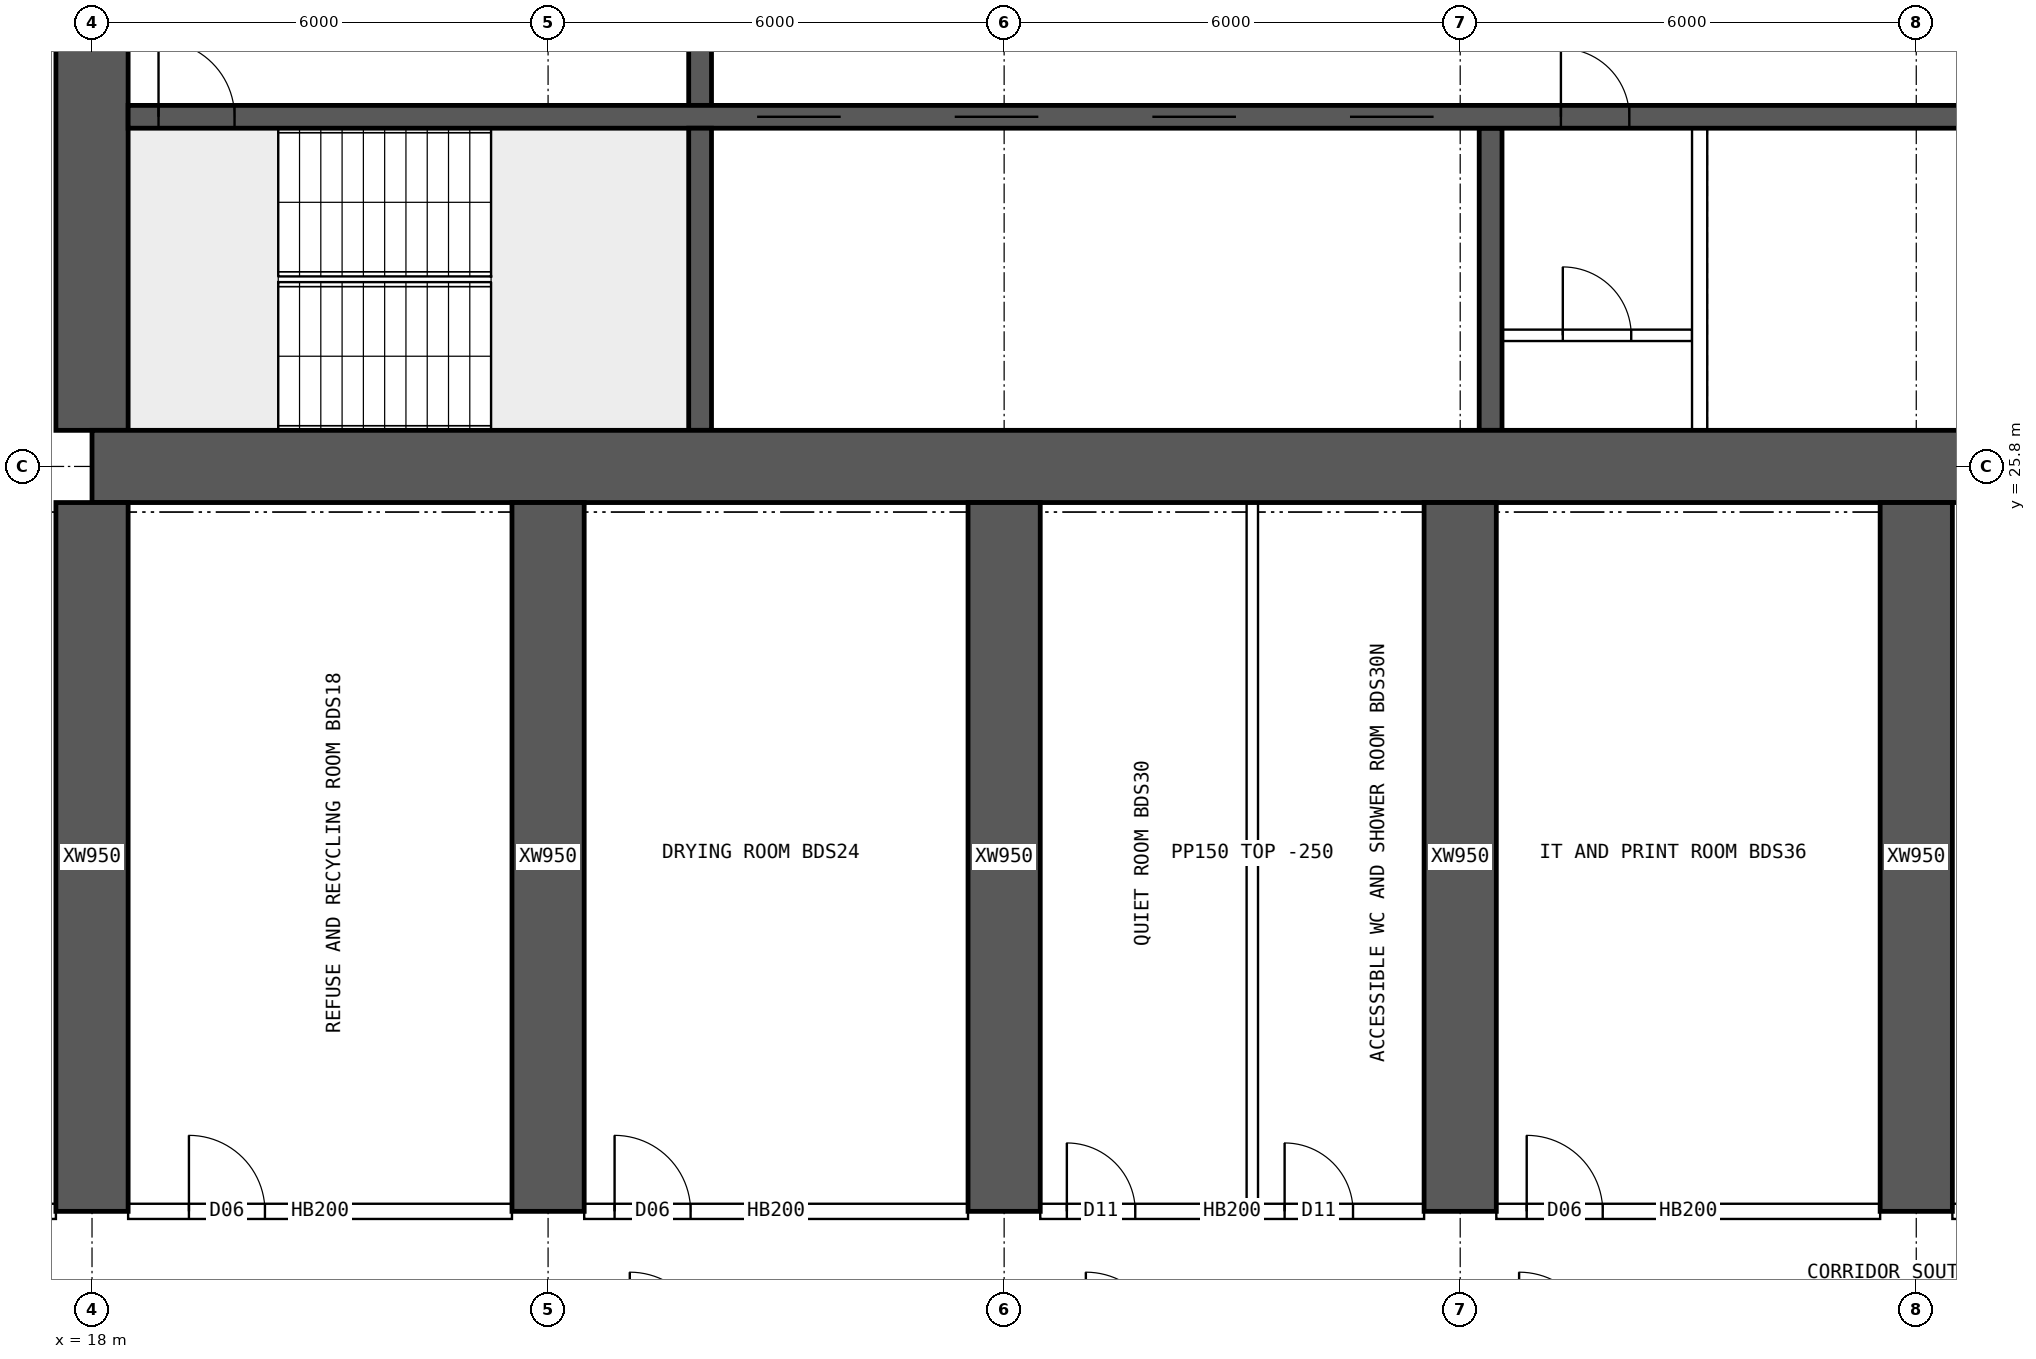
"""IFC4 building model, lengths in metres.
Left out: names, types, materials, properties, quantities, classifications, styles, units other than length and angle.
Written with IfcOpenShell. Run it as: python <this file> out.ifc"""

import sys

from ifc_helpers import new_model, si_unit, direction, frame, frame_2d, origin, place, context, subcontext, project, spatial, rectangle, extrude, element, fill, save


model = new_model("IFC4")
c1 = context("Model", 3, precision=1e-05, world=origin(), true_north=direction((0.0, 1.0)))
c2 = subcontext(c1, "Body", "Model", "MODEL_VIEW")
j1 = project(units=[si_unit("LENGTHUNIT", "METRE"), si_unit("PLANEANGLEUNIT", "RADIAN")], contexts=[c1])
p1 = place(None, origin())
s1 = spatial("IfcSite", under=j1, at=p1, CompositionType="ELEMENT")
p2 = place(p1, origin())
s2 = spatial("IfcBuilding", under=s1, at=p2, CompositionType="ELEMENT")
p3 = place(p2, frame((0.0, 0.0, 103.15)))
s3 = spatial("IfcBuildingStorey", under=s2, at=p3, CompositionType="ELEMENT", Elevation=103.15)
p4 = place(p3, frame((18.0, 25.8, 0.0), z_axis=(0.0, 0.0, 1.0), x_axis=(1.0, 0.0, 0.0)))
e1 = element("IfcWall", 1, at=p4, inside=s3, PredefinedType="SHEAR", context=c2, shape_type="SweptSolid", body=[
    extrude(rectangle(XDim=48.0, YDim=0.95, at=frame_2d((24.0, 0.0))), origin(), (0.0, 0.0, 1.0), 3.75),
])
p5 = place(p3, frame((18.0, 26.275, 0.0), z_axis=(0.0, 0.0, 1.0), x_axis=(0.0, 1.0, 0.0)))
e2 = element("IfcWall", 2, at=p5, inside=s3, PredefinedType="SHEAR", context=c2, shape_type="SweptSolid", body=[
    extrude(rectangle(XDim=11.45, YDim=0.95, at=frame_2d((5.725, 0.0))), origin(), (0.0, 0.0, 1.0), 3.75),
])
p6 = place(p5, frame((5.025, 0.0, 0.0)))
e3 = element("IfcOpeningElement", 3, at=p6, cuts=e2, PredefinedType="OPENING", context=c2, shape_type="SweptSolid", body=[
    extrude(rectangle(XDim=1.2, YDim=2.1, at=frame_2d((0.6, 1.05))), frame((0.0, 0.485, 0.0), z_axis=(0.0, -1.0, 0.0), x_axis=(1.0, 0.0, 0.0)), (0.0, 0.0, 1.0), 0.97),
])
p7 = place(p3, frame((18.475, 30.4, 0.0), z_axis=(0.0, 0.0, 1.0), x_axis=(1.0, 0.0, 0.0)))
e4 = element("IfcWall", 4, at=p7, inside=s3, PredefinedType="SHEAR", context=c2, shape_type="SweptSolid", body=[
    extrude(rectangle(XDim=47.05, YDim=0.3, at=frame_2d((23.525, 0.0))), origin(), (0.0, 0.0, 1.0), 3.75),
])
p8 = place(p7, frame((0.4, 0.0, 0.0)))
e5 = element("IfcOpeningElement", 5, at=p8, cuts=e4, PredefinedType="OPENING", context=c2, shape_type="SweptSolid", body=[
    extrude(rectangle(XDim=1.0, YDim=2.1, at=frame_2d((0.5, 1.05))), frame((0.0, 0.16, 0.0), z_axis=(0.0, -1.0, 0.0), x_axis=(1.0, 0.0, 0.0)), (0.0, 0.0, 1.0), 0.32),
])
p9 = place(p7, frame((45.65, 0.0, 0.0)))
e6 = element("IfcOpeningElement", 6, at=p9, cuts=e4, PredefinedType="OPENING", context=c2, shape_type="SweptSolid", body=[
    extrude(rectangle(XDim=1.0, YDim=2.1, at=frame_2d((0.5, 1.05))), frame((0.0, 0.16, 0.0), z_axis=(0.0, -1.0, 0.0), x_axis=(1.0, 0.0, 0.0)), (0.0, 0.0, 1.0), 0.32),
])
p10 = place(p7, frame((8.275, 0.0, 0.0)))
e7 = element("IfcOpeningElement", 7, at=p10, cuts=e4, PredefinedType="OPENING", context=c2, shape_type="SweptSolid", body=[
    extrude(rectangle(XDim=1.1, YDim=2.1, at=frame_2d((0.55, 1.05))), frame((0.0, 0.16, 0.0), z_axis=(0.0, -1.0, 0.0), x_axis=(1.0, 0.0, 0.0)), (0.0, 0.0, 1.0), 0.32),
])
p11 = place(p7, frame((10.875, 0.0, 0.0)))
e8 = element("IfcOpeningElement", 8, at=p11, cuts=e4, PredefinedType="OPENING", context=c2, shape_type="SweptSolid", body=[
    extrude(rectangle(XDim=1.1, YDim=2.1, at=frame_2d((0.55, 1.05))), frame((0.0, 0.16, 0.0), z_axis=(0.0, -1.0, 0.0), x_axis=(1.0, 0.0, 0.0)), (0.0, 0.0, 1.0), 0.32),
])
p12 = place(p7, frame((13.475, 0.0, 0.0)))
e9 = element("IfcOpeningElement", 9, at=p12, cuts=e4, PredefinedType="OPENING", context=c2, shape_type="SweptSolid", body=[
    extrude(rectangle(XDim=1.1, YDim=2.1, at=frame_2d((0.55, 1.05))), frame((0.0, 0.16, 0.0), z_axis=(0.0, -1.0, 0.0), x_axis=(1.0, 0.0, 0.0)), (0.0, 0.0, 1.0), 0.32),
])
p13 = place(p7, frame((16.075, 0.0, 0.0)))
e10 = element("IfcOpeningElement", 10, at=p13, cuts=e4, PredefinedType="OPENING", context=c2, shape_type="SweptSolid", body=[
    extrude(rectangle(XDim=1.1, YDim=2.1, at=frame_2d((0.55, 1.05))), frame((0.0, 0.16, 0.0), z_axis=(0.0, -1.0, 0.0), x_axis=(1.0, 0.0, 0.0)), (0.0, 0.0, 1.0), 0.32),
])
p14 = place(p7, frame((18.85, 0.0, 0.0)))
e11 = element("IfcOpeningElement", 11, at=p14, cuts=e4, PredefinedType="OPENING", context=c2, shape_type="SweptSolid", body=[
    extrude(rectangle(XDim=0.9, YDim=2.1, at=frame_2d((0.45, 1.05))), frame((0.0, 0.16, 0.0), z_axis=(0.0, -1.0, 0.0), x_axis=(1.0, 0.0, 0.0)), (0.0, 0.0, 1.0), 0.32),
])
p15 = place(p7, frame((30.142, 0.0, 0.0)))
e12 = element("IfcOpeningElement", 12, at=p15, cuts=e4, PredefinedType="OPENING", context=c2, shape_type="SweptSolid", body=[
    extrude(rectangle(XDim=1.1, YDim=2.1, at=frame_2d((0.55, 1.05))), frame((0.0, 0.16, 0.0), z_axis=(0.0, -1.0, 0.0), x_axis=(1.0, 0.0, 0.0)), (0.0, 0.0, 1.0), 0.32),
])
p16 = place(p7, frame((33.675, 0.0, 0.0)))
e13 = element("IfcOpeningElement", 13, at=p16, cuts=e4, PredefinedType="OPENING", context=c2, shape_type="SweptSolid", body=[
    extrude(rectangle(XDim=1.1, YDim=2.1, at=frame_2d((0.55, 1.05))), frame((0.0, 0.16, 0.0), z_axis=(0.0, -1.0, 0.0), x_axis=(1.0, 0.0, 0.0)), (0.0, 0.0, 1.0), 0.32),
])
p17 = place(p7, frame((37.208, 0.0, 0.0)))
e14 = element("IfcOpeningElement", 14, at=p17, cuts=e4, PredefinedType="OPENING", context=c2, shape_type="SweptSolid", body=[
    extrude(rectangle(XDim=1.1, YDim=2.1, at=frame_2d((0.55, 1.05))), frame((0.0, 0.16, 0.0), z_axis=(0.0, -1.0, 0.0), x_axis=(1.0, 0.0, 0.0)), (0.0, 0.0, 1.0), 0.32),
])
p18 = place(p3, frame((26.0, 26.275, 0.0), z_axis=(0.0, 0.0, 1.0), x_axis=(0.0, 1.0, 0.0)))
e15 = element("IfcWall", 15, at=p18, inside=s3, PredefinedType="SHEAR", context=c2, shape_type="SweptSolid", body=[
    extrude(rectangle(XDim=3.975, YDim=0.3, at=frame_2d((1.988, 0.0))), origin(), (0.0, 0.0, 1.0), 3.75),
])
p19 = place(p3, frame((26.0, 30.55, 0.0), z_axis=(0.0, 0.0, 1.0), x_axis=(0.0, 1.0, 0.0)))
e16 = element("IfcWall", 16, at=p19, inside=s3, PredefinedType="SHEAR", context=c2, shape_type="SweptSolid", body=[
    extrude(rectangle(XDim=3.9, YDim=0.3, at=frame_2d((1.95, 0.0))), origin(), (0.0, 0.0, 1.0), 3.75),
])
p20 = place(p19, frame((1.4, 0.0, 0.0)))
e17 = element("IfcOpeningElement", 17, at=p20, cuts=e16, PredefinedType="OPENING", context=c2, shape_type="SweptSolid", body=[
    extrude(rectangle(XDim=1.2, YDim=2.1, at=frame_2d((0.6, 1.05))), frame((0.0, 0.16, 0.0), z_axis=(0.0, -1.0, 0.0), x_axis=(1.0, 0.0, 0.0)), (0.0, 0.0, 1.0), 0.32),
])
p21 = place(p3, frame((36.4, 26.275, 0.0), z_axis=(0.0, 0.0, 1.0), x_axis=(0.0, 1.0, 0.0)))
e18 = element("IfcWall", 18, at=p21, inside=s3, PredefinedType="SHEAR", context=c2, shape_type="SweptSolid", body=[
    extrude(rectangle(XDim=3.975, YDim=0.3, at=frame_2d((1.988, 0.0))), origin(), (0.0, 0.0, 1.0), 3.75),
])
for number, where, z_axis, x_axis in (
    (19, (18.0, 16.0, 0.0), (0.0, 0.0, 1.0), (0.0, 1.0, 0.0)),
    (20, (24.0, 16.0, 0.0), (0.0, 0.0, 1.0), (0.0, 1.0, 0.0)),
    (21, (30.0, 16.0, 0.0), (0.0, 0.0, 1.0), (0.0, 1.0, 0.0)),
    (22, (36.0, 16.0, 0.0), (0.0, 0.0, 1.0), (0.0, 1.0, 0.0)),
    (23, (42.0, 16.0, 0.0), (0.0, 0.0, 1.0), (0.0, 1.0, 0.0)),
):
    element("IfcWall", number, at=place(p3, frame(where, z_axis=z_axis, x_axis=x_axis)), inside=s3, PredefinedType="SHEAR", context=c2, shape_type="SweptSolid", body=[
        extrude(rectangle(XDim=9.325, YDim=0.95, at=frame_2d((4.663, 0.0))), origin(), (0.0, 0.0, 1.0), 3.75),
    ])
p22 = place(p3, frame((36.55, 27.525, 0.0), z_axis=(0.0, 0.0, 1.0), x_axis=(1.0, 0.0, 0.0)))
e24 = element("IfcWall", 24, at=p22, inside=s3, PredefinedType="SOLIDWALL", context=c2, shape_type="SweptSolid", body=[
    extrude(rectangle(XDim=2.5, YDim=0.15, at=frame_2d((1.25, 0.0))), origin(), (0.0, 0.0, 1.0), 3.5),
])
p23 = place(p22, frame((0.8, 0.0, 0.0)))
e25 = element("IfcOpeningElement", 25, at=p23, cuts=e24, PredefinedType="OPENING", context=c2, shape_type="SweptSolid", body=[
    extrude(rectangle(XDim=0.9, YDim=2.1, at=frame_2d((0.45, 1.05))), frame((0.0, 0.085, 0.0), z_axis=(0.0, -1.0, 0.0), x_axis=(1.0, 0.0, 0.0)), (0.0, 0.0, 1.0), 0.17),
])
p24 = place(p3, frame((39.15, 26.275, 0.0), z_axis=(0.0, 0.0, 1.0), x_axis=(0.0, 1.0, 0.0)))
e26 = element("IfcWall", 26, at=p24, inside=s3, PredefinedType="SOLIDWALL", context=c2, shape_type="SweptSolid", body=[
    extrude(rectangle(XDim=3.975, YDim=0.2, at=frame_2d((1.988, 0.0))), origin(), (0.0, 0.0, 1.0), 3.5),
])
p25 = place(p3, frame((12.475, 16.0, 0.0), z_axis=(0.0, 0.0, 1.0), x_axis=(1.0, 0.0, 0.0)))
e27 = element("IfcWall", 27, at=p25, inside=s3, PredefinedType="SOLIDWALL", context=c2, shape_type="SweptSolid", body=[
    extrude(rectangle(XDim=5.05, YDim=0.2, at=frame_2d((2.525, 0.0))), origin(), (0.0, 0.0, 1.0), 3.5),
])
p26 = place(p25, frame((3.325, 0.0, 0.0)))
e28 = element("IfcOpeningElement", 28, at=p26, cuts=e27, PredefinedType="OPENING", context=c2, shape_type="SweptSolid", body=[
    extrude(rectangle(XDim=1.6, YDim=2.1, at=frame_2d((0.8, 1.05))), frame((0.0, 0.11, 0.0), z_axis=(0.0, -1.0, 0.0), x_axis=(1.0, 0.0, 0.0)), (0.0, 0.0, 1.0), 0.22),
])
p27 = place(p3, frame((18.475, 16.0, 0.0), z_axis=(0.0, 0.0, 1.0), x_axis=(1.0, 0.0, 0.0)))
e29 = element("IfcWall", 29, at=p27, inside=s3, PredefinedType="SOLIDWALL", context=c2, shape_type="SweptSolid", body=[
    extrude(rectangle(XDim=5.05, YDim=0.2, at=frame_2d((2.525, 0.0))), origin(), (0.0, 0.0, 1.0), 3.5),
])
p28 = place(p27, frame((0.8, 0.0, 0.0)))
e30 = element("IfcOpeningElement", 30, at=p28, cuts=e29, PredefinedType="OPENING", context=c2, shape_type="SweptSolid", body=[
    extrude(rectangle(XDim=1.0, YDim=2.1, at=frame_2d((0.5, 1.05))), frame((0.0, 0.11, 0.0), z_axis=(0.0, -1.0, 0.0), x_axis=(1.0, 0.0, 0.0)), (0.0, 0.0, 1.0), 0.22),
])
p29 = place(p3, frame((24.475, 16.0, 0.0), z_axis=(0.0, 0.0, 1.0), x_axis=(1.0, 0.0, 0.0)))
e31 = element("IfcWall", 31, at=p29, inside=s3, PredefinedType="SOLIDWALL", context=c2, shape_type="SweptSolid", body=[
    extrude(rectangle(XDim=5.05, YDim=0.2, at=frame_2d((2.525, 0.0))), origin(), (0.0, 0.0, 1.0), 3.5),
])
p30 = place(p29, frame((0.4, 0.0, 0.0)))
e32 = element("IfcOpeningElement", 32, at=p30, cuts=e31, PredefinedType="OPENING", context=c2, shape_type="SweptSolid", body=[
    extrude(rectangle(XDim=1.0, YDim=2.1, at=frame_2d((0.5, 1.05))), frame((0.0, 0.11, 0.0), z_axis=(0.0, -1.0, 0.0), x_axis=(1.0, 0.0, 0.0)), (0.0, 0.0, 1.0), 0.22),
])
p31 = place(p3, frame((30.475, 16.0, 0.0), z_axis=(0.0, 0.0, 1.0), x_axis=(1.0, 0.0, 0.0)))
e33 = element("IfcWall", 33, at=p31, inside=s3, PredefinedType="SOLIDWALL", context=c2, shape_type="SweptSolid", body=[
    extrude(rectangle(XDim=5.05, YDim=0.2, at=frame_2d((2.525, 0.0))), origin(), (0.0, 0.0, 1.0), 3.5),
])
p32 = place(p31, frame((0.35, 0.0, 0.0)))
e34 = element("IfcOpeningElement", 34, at=p32, cuts=e33, PredefinedType="OPENING", context=c2, shape_type="SweptSolid", body=[
    extrude(rectangle(XDim=0.9, YDim=2.1, at=frame_2d((0.45, 1.05))), frame((0.0, 0.11, 0.0), z_axis=(0.0, -1.0, 0.0), x_axis=(1.0, 0.0, 0.0)), (0.0, 0.0, 1.0), 0.22),
])
p33 = place(p31, frame((3.215, 0.0, 0.0)))
e35 = element("IfcOpeningElement", 35, at=p33, cuts=e33, PredefinedType="OPENING", context=c2, shape_type="SweptSolid", body=[
    extrude(rectangle(XDim=0.9, YDim=2.1, at=frame_2d((0.45, 1.05))), frame((0.0, 0.11, 0.0), z_axis=(0.0, -1.0, 0.0), x_axis=(1.0, 0.0, 0.0)), (0.0, 0.0, 1.0), 0.22),
])
p34 = place(p3, frame((36.475, 16.0, 0.0), z_axis=(0.0, 0.0, 1.0), x_axis=(1.0, 0.0, 0.0)))
e36 = element("IfcWall", 36, at=p34, inside=s3, PredefinedType="SOLIDWALL", context=c2, shape_type="SweptSolid", body=[
    extrude(rectangle(XDim=5.05, YDim=0.2, at=frame_2d((2.525, 0.0))), origin(), (0.0, 0.0, 1.0), 3.5),
])
p35 = place(p34, frame((0.4, 0.0, 0.0)))
e37 = element("IfcOpeningElement", 37, at=p35, cuts=e36, PredefinedType="OPENING", context=c2, shape_type="SweptSolid", body=[
    extrude(rectangle(XDim=1.0, YDim=2.1, at=frame_2d((0.5, 1.05))), frame((0.0, 0.11, 0.0), z_axis=(0.0, -1.0, 0.0), x_axis=(1.0, 0.0, 0.0)), (0.0, 0.0, 1.0), 0.22),
])
p36 = place(p3, frame((42.475, 16.0, 0.0), z_axis=(0.0, 0.0, 1.0), x_axis=(1.0, 0.0, 0.0)))
e38 = element("IfcWall", 38, at=p36, inside=s3, PredefinedType="SOLIDWALL", context=c2, shape_type="SweptSolid", body=[
    extrude(rectangle(XDim=5.05, YDim=0.2, at=frame_2d((2.525, 0.0))), origin(), (0.0, 0.0, 1.0), 3.5),
])
p37 = place(p36, frame((0.35, 0.0, 0.0)))
e39 = element("IfcOpeningElement", 39, at=p37, cuts=e38, PredefinedType="OPENING", context=c2, shape_type="SweptSolid", body=[
    extrude(rectangle(XDim=0.9, YDim=2.1, at=frame_2d((0.45, 1.05))), frame((0.0, 0.11, 0.0), z_axis=(0.0, -1.0, 0.0), x_axis=(1.0, 0.0, 0.0)), (0.0, 0.0, 1.0), 0.22),
])
p38 = place(p36, frame((3.645, 0.0, 0.0)))
e40 = element("IfcOpeningElement", 40, at=p38, cuts=e38, PredefinedType="OPENING", context=c2, shape_type="SweptSolid", body=[
    extrude(rectangle(XDim=0.9, YDim=2.1, at=frame_2d((0.45, 1.05))), frame((0.0, 0.11, 0.0), z_axis=(0.0, -1.0, 0.0), x_axis=(1.0, 0.0, 0.0)), (0.0, 0.0, 1.0), 0.22),
])
p39 = place(p3, frame((33.265, 16.1, 0.0), z_axis=(0.0, 0.0, 1.0), x_axis=(0.0, 1.0, 0.0)))
e41 = element("IfcWall", 41, at=p39, inside=s3, PredefinedType="PARTITIONING", context=c2, shape_type="SweptSolid", body=[
    extrude(rectangle(XDim=9.225, YDim=0.15, at=frame_2d((4.612, 0.0))), origin(), (0.0, 0.0, 1.0), 3.5),
])
p40 = place(p8, origin())
e42 = element("IfcDoor", 42, at=p40, inside=s3, OperationType="SINGLE_SWING_LEFT", PredefinedType="DOOR", context=c2, shape_type="SweptSolid", body=[
    extrude(rectangle(XDim=1.0, YDim=2.1, at=frame_2d((0.5, 1.05))), frame((0.0, 0.025, 0.0), z_axis=(0.0, -1.0, 0.0), x_axis=(1.0, 0.0, 0.0)), (0.0, 0.0, 1.0), 0.05),
])
fill(e5, e42)
p41 = place(p10, origin())
e43 = element("IfcDoor", 43, at=p41, inside=s3, OperationType="DOUBLE_DOOR_SLIDING", PredefinedType="DOOR", context=c2, shape_type="SweptSolid", body=[
    extrude(rectangle(XDim=1.1, YDim=2.1, at=frame_2d((0.55, 1.05))), frame((0.0, 0.025, 0.0), z_axis=(0.0, -1.0, 0.0), x_axis=(1.0, 0.0, 0.0)), (0.0, 0.0, 1.0), 0.05),
])
fill(e7, e43)
p42 = place(p11, origin())
e44 = element("IfcDoor", 44, at=p42, inside=s3, OperationType="DOUBLE_DOOR_SLIDING", PredefinedType="DOOR", context=c2, shape_type="SweptSolid", body=[
    extrude(rectangle(XDim=1.1, YDim=2.1, at=frame_2d((0.55, 1.05))), frame((0.0, 0.025, 0.0), z_axis=(0.0, -1.0, 0.0), x_axis=(1.0, 0.0, 0.0)), (0.0, 0.0, 1.0), 0.05),
])
fill(e8, e44)
p43 = place(p12, origin())
e45 = element("IfcDoor", 45, at=p43, inside=s3, OperationType="DOUBLE_DOOR_SLIDING", PredefinedType="DOOR", context=c2, shape_type="SweptSolid", body=[
    extrude(rectangle(XDim=1.1, YDim=2.1, at=frame_2d((0.55, 1.05))), frame((0.0, 0.025, 0.0), z_axis=(0.0, -1.0, 0.0), x_axis=(1.0, 0.0, 0.0)), (0.0, 0.0, 1.0), 0.05),
])
fill(e9, e45)
p44 = place(p13, origin())
e46 = element("IfcDoor", 46, at=p44, inside=s3, OperationType="DOUBLE_DOOR_SLIDING", PredefinedType="DOOR", context=c2, shape_type="SweptSolid", body=[
    extrude(rectangle(XDim=1.1, YDim=2.1, at=frame_2d((0.55, 1.05))), frame((0.0, 0.025, 0.0), z_axis=(0.0, -1.0, 0.0), x_axis=(1.0, 0.0, 0.0)), (0.0, 0.0, 1.0), 0.05),
])
fill(e10, e46)
p45 = place(p23, origin())
e47 = element("IfcDoor", 47, at=p45, inside=s3, OperationType="SINGLE_SWING_LEFT", PredefinedType="DOOR", context=c2, shape_type="SweptSolid", body=[
    extrude(rectangle(XDim=0.9, YDim=2.1, at=frame_2d((0.45, 1.05))), frame((0.0, 0.025, 0.0), z_axis=(0.0, -1.0, 0.0), x_axis=(1.0, 0.0, 0.0)), (0.0, 0.0, 1.0), 0.05),
])
fill(e25, e47)
p46 = place(p14, origin())
e48 = element("IfcDoor", 48, at=p46, inside=s3, OperationType="SINGLE_SWING_LEFT", PredefinedType="DOOR", context=c2, shape_type="SweptSolid", body=[
    extrude(rectangle(XDim=0.9, YDim=2.1, at=frame_2d((0.45, 1.05))), frame((0.0, 0.025, 0.0), z_axis=(0.0, -1.0, 0.0), x_axis=(1.0, 0.0, 0.0)), (0.0, 0.0, 1.0), 0.05),
])
fill(e11, e48)
p47 = place(p28, origin())
e49 = element("IfcDoor", 49, at=p47, inside=s3, OperationType="SINGLE_SWING_LEFT", PredefinedType="DOOR", context=c2, shape_type="SweptSolid", body=[
    extrude(rectangle(XDim=1.0, YDim=2.1, at=frame_2d((0.5, 1.05))), frame((0.0, 0.025, 0.0), z_axis=(0.0, -1.0, 0.0), x_axis=(1.0, 0.0, 0.0)), (0.0, 0.0, 1.0), 0.05),
])
fill(e30, e49)
p48 = place(p30, origin())
e50 = element("IfcDoor", 50, at=p48, inside=s3, OperationType="SINGLE_SWING_LEFT", PredefinedType="DOOR", context=c2, shape_type="SweptSolid", body=[
    extrude(rectangle(XDim=1.0, YDim=2.1, at=frame_2d((0.5, 1.05))), frame((0.0, 0.025, 0.0), z_axis=(0.0, -1.0, 0.0), x_axis=(1.0, 0.0, 0.0)), (0.0, 0.0, 1.0), 0.05),
])
fill(e32, e50)
p49 = place(p32, origin())
e51 = element("IfcDoor", 51, at=p49, inside=s3, OperationType="SINGLE_SWING_LEFT", PredefinedType="DOOR", context=c2, shape_type="SweptSolid", body=[
    extrude(rectangle(XDim=0.9, YDim=2.1, at=frame_2d((0.45, 1.05))), frame((0.0, 0.025, 0.0), z_axis=(0.0, -1.0, 0.0), x_axis=(1.0, 0.0, 0.0)), (0.0, 0.0, 1.0), 0.05),
])
fill(e34, e51)
p50 = place(p33, origin())
e52 = element("IfcDoor", 52, at=p50, inside=s3, OperationType="SINGLE_SWING_LEFT", PredefinedType="DOOR", context=c2, shape_type="SweptSolid", body=[
    extrude(rectangle(XDim=0.9, YDim=2.1, at=frame_2d((0.45, 1.05))), frame((0.0, 0.025, 0.0), z_axis=(0.0, -1.0, 0.0), x_axis=(1.0, 0.0, 0.0)), (0.0, 0.0, 1.0), 0.05),
])
fill(e35, e52)
p51 = place(p35, origin())
e53 = element("IfcDoor", 53, at=p51, inside=s3, OperationType="SINGLE_SWING_LEFT", PredefinedType="DOOR", context=c2, shape_type="SweptSolid", body=[
    extrude(rectangle(XDim=1.0, YDim=2.1, at=frame_2d((0.5, 1.05))), frame((0.0, 0.025, 0.0), z_axis=(0.0, -1.0, 0.0), x_axis=(1.0, 0.0, 0.0)), (0.0, 0.0, 1.0), 0.05),
])
fill(e37, e53)
save(model, sys.argv[1])
